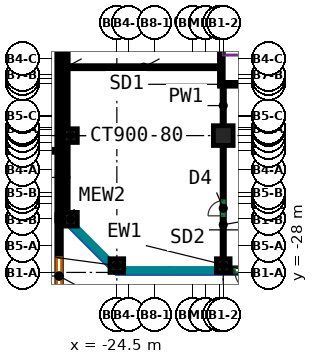
"""IFC4 building model, lengths in metres.
Left out: names, types, materials, properties, quantities, classifications, styles, units other than length and angle.
Written with IfcOpenShell. Run it as: python <this file> out.ifc"""

import sys

from ifc_helpers import new_model, si_unit, direction, frame, frame_2d, origin, origin_2d, place, context, subcontext, project, spatial, rectangle, extrude, source, transform, mapped, element, fill, save


model = new_model("IFC4")
c1 = context("Model", 3, precision=1e-05, world=origin(), true_north=direction((0.0, 1.0)))
c2 = subcontext(c1, "Body", "Model", "MODEL_VIEW")
j1 = project(units=[si_unit("LENGTHUNIT", "METRE"), si_unit("PLANEANGLEUNIT", "RADIAN")], contexts=[c1])
p1 = place(None, origin())
s1 = spatial("IfcSite", under=j1, at=p1, CompositionType="ELEMENT")
p2 = place(p1, origin())
s2 = spatial("IfcBuilding", under=s1, at=p2, CompositionType="ELEMENT")
p3 = place(p2, origin())
s3 = spatial("IfcBuildingStorey", under=s2, at=p3, CompositionType="ELEMENT", Elevation=0.0)
m1 = source(origin(), c2, "Body", "SweptSolid", [
    extrude(rectangle(XDim=0.9, YDim=0.9, at=origin_2d()), origin(), (0.0, 0.0, 1.0), 8.6),
])
for number, where, z_axis, x_axis in (
    (1, (-27.55, -24.5, 0.0), (0.0, 0.0, 1.0), (1.0, 0.0, 0.0)),
    (2, (-27.55, -19.0, 0.0), (0.0, 0.0, 1.0), (1.0, 0.0, 0.0)),
    (3, (-24.5, -27.55, 0.0), (0.0, 0.0, 1.0), (1.0, 0.0, 0.0)),
    (4, (-17.5, -27.55, 0.0), (0.0, 0.0, 1.0), (1.0, 0.0, 0.0)),
):
    element("IfcColumn", number, at=place(p3, frame(where, z_axis=z_axis, x_axis=x_axis)), inside=s3, PredefinedType="COLUMN", context=c2, shape_type="MappedRepresentation", body=[
        mapped(m1, transform((0.0, 0.0, 0.0))),
    ])
m2 = source(origin(), c2, "Body", "SweptSolid", [
    extrude(rectangle(XDim=1.3, YDim=1.3, at=origin_2d()), origin(), (0.0, 0.0, 1.0), 8.6),
])
p4 = place(p3, frame((-17.5, -19.0, 0.0), z_axis=(0.0, 0.0, 1.0), x_axis=(1.0, 0.0, 0.0)))
e5 = element("IfcColumn", 5, at=p4, inside=s3, PredefinedType="COLUMN", context=c2, shape_type="MappedRepresentation", body=[
    mapped(m2, transform((0.0, 0.0, 0.0))),
])
m3 = source(origin(), c2, "Body", "SweptSolid", [
    extrude(rectangle(XDim=8.0, YDim=0.25, at=frame_2d((4.0, 0.0))), origin(), (0.0, 0.0, 1.0), 8.6),
])
p5 = place(p3, frame((-17.625, -15.75, 0.0), z_axis=(0.0, 0.0, 1.0), x_axis=(0.0, 1.0, 0.0)))
e6 = element("IfcWall", 6, at=p5, inside=s3, PredefinedType="SHEAR", context=c2, shape_type="MappedRepresentation", body=[
    mapped(m3, transform((0.0, 0.0, 0.0))),
])
m4 = source(origin(), c2, "Body", "SweptSolid", [
    extrude(rectangle(XDim=3.7, YDim=0.25, at=frame_2d((1.85, 0.0))), origin(), (0.0, 0.0, 1.0), 8.6),
])
p6 = place(p3, frame((-17.5, -15.625, 0.0), z_axis=(0.0, 0.0, 1.0), x_axis=(1.0, 0.0, 0.0)))
e7 = element("IfcWall", 7, at=p6, inside=s3, PredefinedType="SHEAR", context=c2, shape_type="MappedRepresentation", body=[
    mapped(m4, transform((0.0, 0.0, 0.0))),
])
p7 = place(p6, frame((2.5, 0.0, 0.0)))
e8 = element("IfcOpeningElement", 8, at=p7, cuts=e7, PredefinedType="OPENING", context=c2, shape_type="SweptSolid", body=[
    extrude(rectangle(XDim=1.2, YDim=2.1, at=frame_2d((0.6, 1.05))), frame((0.0, 0.135, 0.0), z_axis=(0.0, -1.0, 0.0), x_axis=(1.0, 0.0, 0.0)), (0.0, 0.0, 1.0), 0.27),
])
m5 = source(origin(), c2, "Body", "SweptSolid", [
    extrude(rectangle(XDim=2.6, YDim=0.3, at=frame_2d((1.3, 0.0))), origin(), (0.0, 0.0, 1.0), 8.6),
])
p8 = place(p3, frame((-14.7, -27.85, 0.0), z_axis=(0.0, 0.0, 1.0), x_axis=(-1.0, 0.0, 0.0)))
e9 = element("IfcWall", 9, at=p8, inside=s3, PredefinedType="SOLIDWALL", context=c2, shape_type="MappedRepresentation", body=[
    mapped(m5, transform((0.0, 0.0, 0.0))),
])
p9 = place(p8, frame((0.55, 0.0, 0.0)))
e10 = element("IfcOpeningElement", 10, at=p9, cuts=e9, PredefinedType="OPENING", context=c2, shape_type="SweptSolid", body=[
    extrude(rectangle(XDim=1.5, YDim=2.4, at=frame_2d((0.75, 1.2))), frame((0.0, 0.16, 0.0), z_axis=(0.0, -1.0, 0.0), x_axis=(1.0, 0.0, 0.0)), (0.0, 0.0, 1.0), 0.32),
])
m6 = source(origin(), c2, "Body", "SweptSolid", [
    extrude(rectangle(XDim=8.1, YDim=0.3, at=frame_2d((4.05, 0.0))), origin(), (0.0, 0.0, 1.0), 8.6),
])
p10 = place(p3, frame((-27.85, -10.45, 0.0), z_axis=(0.0, 0.0, 1.0), x_axis=(0.0, -1.0, 0.0)))
e11 = element("IfcWall", 11, at=p10, inside=s3, PredefinedType="SOLIDWALL", context=c2, shape_type="MappedRepresentation", body=[
    mapped(m6, transform((0.0, 0.0, 0.0))),
])
m7 = source(origin(), c2, "Body", "SweptSolid", [
    extrude(rectangle(XDim=4.6, YDim=0.3, at=frame_2d((2.3, 0.0))), origin(), (0.0, 0.0, 1.0), 8.6),
])
p11 = place(p3, frame((-27.85, -19.45, 0.0), z_axis=(0.0, 0.0, 1.0), x_axis=(0.0, -1.0, 0.0)))
e12 = element("IfcWall", 12, at=p11, inside=s3, PredefinedType="SOLIDWALL", context=c2, shape_type="MappedRepresentation", body=[
    mapped(m7, transform((0.0, 0.0, 0.0))),
])
m8 = source(origin(), c2, "Body", "SweptSolid", [
    extrude(rectangle(XDim=48.762, YDim=0.3, at=frame_2d((24.381, 0.0))), origin(), (0.0, 0.0, 1.0), 8.6),
])
p12 = place(p3, frame((-28.3, 24.562, 0.0), z_axis=(0.0, 0.0, 1.0), x_axis=(0.0, -1.0, 0.0)))
e13 = element("IfcWall", 13, at=p12, inside=s3, PredefinedType="SOLIDWALL", context=c2, shape_type="MappedRepresentation", body=[
    mapped(m8, transform((0.0, 0.0, 0.0))),
])
m9 = source(origin(), c2, "Body", "SweptSolid", [
    extrude(rectangle(XDim=0.424, YDim=0.3, at=frame_2d((0.212, 0.0))), origin(), (0.0, 0.0, 1.0), 8.6),
])
p13 = place(p3, frame((-28.3, -24.2, 0.0), z_axis=(0.0, 0.0, 1.0), x_axis=(0.0, -1.0, 0.0)))
e14 = element("IfcWall", 14, at=p13, inside=s3, PredefinedType="SOLIDWALL", context=c2, shape_type="MappedRepresentation", body=[
    mapped(m9, transform((0.0, 0.0, 0.0))),
])
m10 = source(origin(), c2, "Body", "SweptSolid", [
    extrude(rectangle(XDim=19.226, YDim=0.3, at=frame_2d((9.613, 0.0))), origin(), (0.0, 0.0, 1.0), 8.6),
])
p14 = place(p3, frame((-28.3, -24.624, 0.0), z_axis=(0.0, 0.0, 1.0), x_axis=(0.0, -1.0, 0.0)))
e15 = element("IfcWall", 15, at=p14, inside=s3, PredefinedType="SOLIDWALL", context=c2, shape_type="MappedRepresentation", body=[
    mapped(m10, transform((0.0, 0.0, 0.0))),
])
p15 = place(p14, frame((13.126, 0.0, 0.0)))
e16 = element("IfcOpeningElement", 16, at=p15, cuts=e15, PredefinedType="OPENING", context=c2, shape_type="SweptSolid", body=[
    extrude(rectangle(XDim=1.5, YDim=2.4, at=frame_2d((0.75, 1.2))), frame((0.0, 0.16, 0.0), z_axis=(0.0, -1.0, 0.0), x_axis=(1.0, 0.0, 0.0)), (0.0, 0.0, 1.0), 0.32),
])
p16 = place(p14, frame((7.126, 0.0, 0.0)))
e17 = element("IfcOpeningElement", 17, at=p16, cuts=e15, PredefinedType="OPENING", context=c2, shape_type="SweptSolid", body=[
    extrude(rectangle(XDim=1.5, YDim=2.4, at=frame_2d((0.75, 1.2))), frame((0.0, 0.16, 0.0), z_axis=(0.0, -1.0, 0.0), x_axis=(1.0, 0.0, 0.0)), (0.0, 0.0, 1.0), 0.32),
])
p17 = place(p14, frame((10.126, 0.0, 0.0)))
e18 = element("IfcOpeningElement", 18, at=p17, cuts=e15, PredefinedType="OPENING", context=c2, shape_type="SweptSolid", body=[
    extrude(rectangle(XDim=1.5, YDim=2.4, at=frame_2d((0.75, 1.2))), frame((0.0, 0.16, 0.0), z_axis=(0.0, -1.0, 0.0), x_axis=(1.0, 0.0, 0.0)), (0.0, 0.0, 1.0), 0.32),
])
p18 = place(p14, frame((2.413, 0.0, 0.6)))
e19 = element("IfcOpeningElement", 19, at=p18, cuts=e15, PredefinedType="OPENING", context=c2, shape_type="SweptSolid", body=[
    extrude(rectangle(XDim=2.4, YDim=3.0, at=frame_2d((1.2, 1.5))), frame((0.0, 0.16, 0.0), z_axis=(0.0, -1.0, 0.0), x_axis=(1.0, 0.0, 0.0)), (0.0, 0.0, 1.0), 0.32),
])
p19 = place(p14, frame((2.413, 0.0, 5.0)))
e20 = element("IfcOpeningElement", 20, at=p19, cuts=e15, PredefinedType="OPENING", context=c2, shape_type="SweptSolid", body=[
    extrude(rectangle(XDim=2.4, YDim=2.0, at=frame_2d((1.2, 1.0))), frame((0.0, 0.16, 0.0), z_axis=(0.0, -1.0, 0.0), x_axis=(1.0, 0.0, 0.0)), (0.0, 0.0, 1.0), 0.32),
])
p20 = place(p3, frame((-17.5, -27.1, 0.0), z_axis=(0.0, 0.0, 1.0), x_axis=(0.0, 1.0, 0.0)))
e21 = element("IfcWall", 21, at=p20, inside=s3, PredefinedType="PARTITIONING", context=c2, shape_type="SweptSolid", body=[
    extrude(rectangle(XDim=7.45, YDim=0.15, at=frame_2d((3.725, 0.0))), origin(), (0.0, 0.0, 1.0), 7.95),
])
p21 = place(p20, frame((2.822, 0.0, 0.0)))
e22 = element("IfcOpeningElement", 22, at=p21, cuts=e21, PredefinedType="OPENING", context=c2, shape_type="SweptSolid", body=[
    extrude(rectangle(XDim=1.0, YDim=2.1, at=frame_2d((0.5, 1.05))), frame((0.0, 0.085, 0.0), z_axis=(0.0, -1.0, 0.0), x_axis=(1.0, 0.0, 0.0)), (0.0, 0.0, 1.0), 0.17),
])
p22 = place(p3, frame((-17.5, -18.35, 0.0), z_axis=(0.0, 0.0, 1.0), x_axis=(0.0, 1.0, 0.0)))
e23 = element("IfcWall", 23, at=p22, inside=s3, PredefinedType="PARTITIONING", context=c2, shape_type="SweptSolid", body=[
    extrude(rectangle(XDim=2.65, YDim=0.15, at=frame_2d((1.325, 0.0))), origin(), (0.0, 0.0, 1.0), 8.6),
])
p23 = place(p3, frame((-17.7, -14.5, 0.0), z_axis=(0.0, 0.0, 1.0), x_axis=(-1.0, 0.0, 0.0)))
e24 = element("IfcWall", 24, at=p23, inside=s3, PredefinedType="PARTITIONING", context=c2, shape_type="SweptSolid", body=[
    extrude(rectangle(XDim=10.05, YDim=0.2, at=frame_2d((5.025, 0.0))), origin(), (0.0, 0.0, 1.0), 8.6),
])
m11 = source(origin(), c2, "Body", "SweptSolid", [
    extrude(rectangle(XDim=5.7, YDim=0.2, at=frame_2d((2.85, 0.0))), origin(), (0.0, 0.0, 1.0), 7.7),
])
p24 = place(p3, frame((-34.15, -20.0, 0.0), z_axis=(0.0, 0.0, 1.0), x_axis=(1.0, 0.0, 0.0)))
e25 = element("IfcWall", 25, at=p24, inside=s3, PredefinedType="PARTITIONING", context=c2, shape_type="MappedRepresentation", body=[
    mapped(m11, transform((0.0, 0.0, 0.0))),
])
p25 = place(p9, origin())
e26 = element("IfcDoor", 26, at=p25, inside=s3, OperationType="DOUBLE_DOOR_SINGLE_SWING", PredefinedType="DOOR", context=c2, shape_type="SweptSolid", body=[
    extrude(rectangle(XDim=1.5, YDim=2.4, at=frame_2d((0.75, 1.2))), frame((0.0, 0.025, 0.0), z_axis=(0.0, -1.0, 0.0), x_axis=(1.0, 0.0, 0.0)), (0.0, 0.0, 1.0), 0.05),
])
fill(e10, e26)
p26 = place(p18, origin())
e27 = element("IfcWindow", 27, at=p26, inside=s3, PartitioningType="SINGLE_PANEL", PredefinedType="WINDOW", context=c2, shape_type="SweptSolid", body=[
    extrude(rectangle(XDim=2.4, YDim=3.0, at=frame_2d((1.2, 1.5))), frame((0.0, 0.03, 0.0), z_axis=(0.0, -1.0, 0.0), x_axis=(1.0, 0.0, 0.0)), (0.0, 0.0, 1.0), 0.06),
])
fill(e19, e27)
p27 = place(p19, origin())
e28 = element("IfcWindow", 28, at=p27, inside=s3, PartitioningType="SINGLE_PANEL", PredefinedType="WINDOW", context=c2, shape_type="SweptSolid", body=[
    extrude(rectangle(XDim=2.4, YDim=2.0, at=frame_2d((1.2, 1.0))), frame((0.0, 0.03, 0.0), z_axis=(0.0, -1.0, 0.0), x_axis=(1.0, 0.0, 0.0)), (0.0, 0.0, 1.0), 0.06),
])
fill(e20, e28)
p28 = place(p21, origin())
e29 = element("IfcDoor", 29, at=p28, inside=s3, OperationType="SINGLE_SWING_LEFT", PredefinedType="DOOR", context=c2, shape_type="SweptSolid", body=[
    extrude(rectangle(XDim=1.0, YDim=2.1, at=frame_2d((0.5, 1.05))), frame((0.0, 0.025, 0.0), z_axis=(0.0, -1.0, 0.0), x_axis=(1.0, 0.0, 0.0)), (0.0, 0.0, 1.0), 0.05),
])
fill(e22, e29)
save(model, sys.argv[1])
